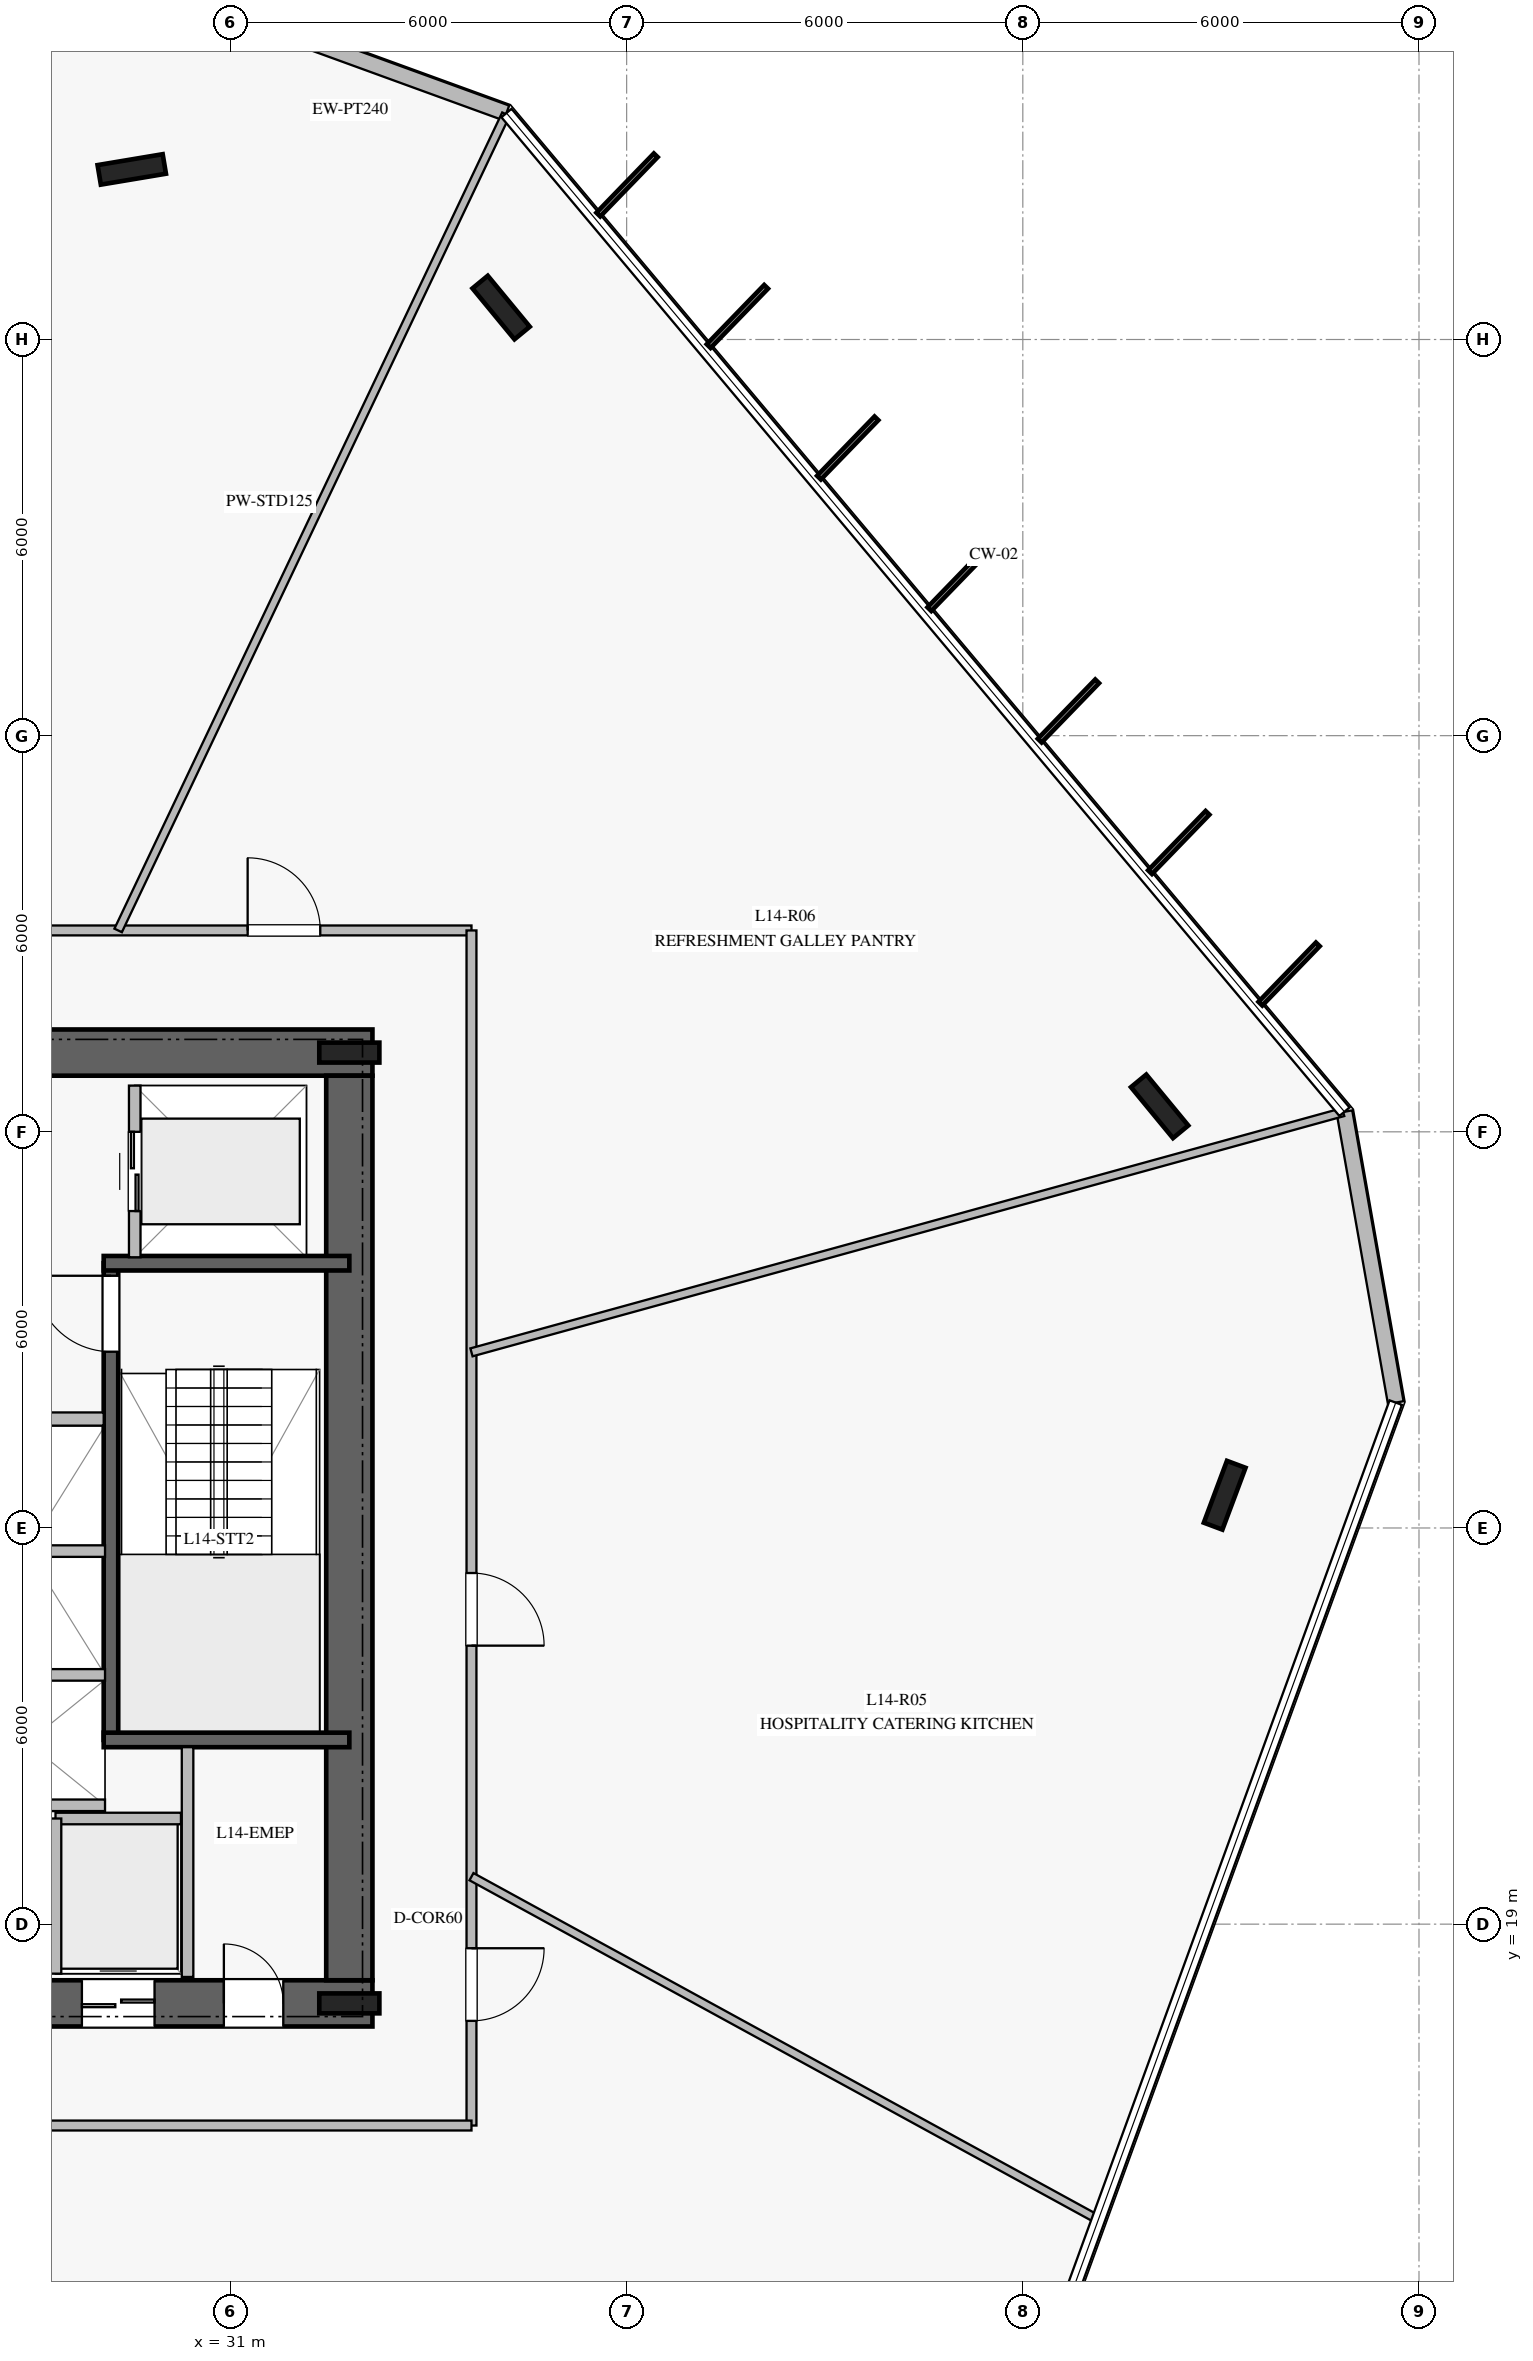
"""IFC4 building model, lengths in metres.
Left out: names, types, materials, properties, quantities, classifications, styles, units other than length and angle.
Written with IfcOpenShell. Run it as: python <this file> out.ifc"""

import sys

from ifc_helpers import new_model, si_unit, direction, frame, frame_2d, origin, origin_2d, place, context, subcontext, project, spatial, rectangle, i_section, extrude, element, fill, save


model = new_model("IFC4")
c1 = context("Model", 3, precision=1e-05, world=origin(), true_north=direction((0.0, 1.0)))
c2 = subcontext(c1, "Body", "Model", "MODEL_VIEW")
j1 = project(units=[si_unit("LENGTHUNIT", "METRE"), si_unit("PLANEANGLEUNIT", "RADIAN")], contexts=[c1])
p1 = place(None, origin())
s1 = spatial("IfcSite", under=j1, at=p1, CompositionType="ELEMENT")
p2 = place(p1, origin())
s2 = spatial("IfcBuilding", under=s1, at=p2, CompositionType="ELEMENT")
p3 = place(p2, frame((0.0, 0.0, 60.0)))
s3 = spatial("IfcBuildingStorey", under=s2, at=p3, CompositionType="ELEMENT", Elevation=60.0)
p4 = place(p3, frame((16.85, 17.8, 0.0), z_axis=(0.0, 0.0, 1.0), x_axis=(1.0, 0.0, 0.0)))
e1 = element("IfcWall", 1, at=p4, inside=s3, PredefinedType="SHEAR", context=c2, shape_type="SweptSolid", body=[
    extrude(rectangle(XDim=16.3, YDim=0.7, at=frame_2d((8.15, 0.0))), origin(), (0.0, 0.0, 1.0), 3.76),
])
p5 = place(p4, frame((5.1, 0.0, 0.0)))
e2 = element("IfcOpeningElement", 2, at=p5, cuts=e1, PredefinedType="OPENING", context=c2, shape_type="SweptSolid", body=[
    extrude(rectangle(XDim=1.2, YDim=2.25, at=frame_2d((0.6, 1.125))), frame((0.0, 0.36, 0.0), z_axis=(0.0, -1.0, 0.0), x_axis=(1.0, 0.0, 0.0)), (0.0, 0.0, 1.0), 0.72),
])
p6 = place(p4, frame((14.05, 0.0, 0.0)))
e3 = element("IfcOpeningElement", 3, at=p6, cuts=e1, PredefinedType="OPENING", context=c2, shape_type="SweptSolid", body=[
    extrude(rectangle(XDim=0.9, YDim=2.1, at=frame_2d((0.45, 1.05))), frame((0.0, 0.36, 0.0), z_axis=(0.0, -1.0, 0.0), x_axis=(1.0, 0.0, 0.0)), (0.0, 0.0, 1.0), 0.72),
])
p7 = place(p4, frame((7.95, 0.0, 0.0)))
e4 = element("IfcOpeningElement", 4, at=p7, cuts=e1, PredefinedType="OPENING", context=c2, shape_type="SweptSolid", body=[
    extrude(rectangle(XDim=1.1, YDim=2.2, at=frame_2d((0.55, 1.1))), frame((0.0, 0.36, 0.0), z_axis=(0.0, -1.0, 0.0), x_axis=(1.0, 0.0, 0.0)), (0.0, 0.0, 1.0), 0.72),
])
p8 = place(p4, frame((9.925, 0.0, 0.0)))
e5 = element("IfcOpeningElement", 5, at=p8, cuts=e1, PredefinedType="OPENING", context=c2, shape_type="SweptSolid", body=[
    extrude(rectangle(XDim=1.1, YDim=2.2, at=frame_2d((0.55, 1.1))), frame((0.0, 0.36, 0.0), z_axis=(0.0, -1.0, 0.0), x_axis=(1.0, 0.0, 0.0)), (0.0, 0.0, 1.0), 0.72),
])
p9 = place(p4, frame((11.9, 0.0, 0.0)))
e6 = element("IfcOpeningElement", 6, at=p9, cuts=e1, PredefinedType="OPENING", context=c2, shape_type="SweptSolid", body=[
    extrude(rectangle(XDim=1.1, YDim=2.2, at=frame_2d((0.55, 1.1))), frame((0.0, 0.36, 0.0), z_axis=(0.0, -1.0, 0.0), x_axis=(1.0, 0.0, 0.0)), (0.0, 0.0, 1.0), 0.72),
])
p10 = place(p3, frame((33.15, 32.2, 0.0), z_axis=(0.0, 0.0, 1.0), x_axis=(-1.0, 0.0, 0.0)))
e7 = element("IfcWall", 7, at=p10, inside=s3, PredefinedType="SHEAR", context=c2, shape_type="SweptSolid", body=[
    extrude(rectangle(XDim=16.3, YDim=0.7, at=frame_2d((8.15, 0.0))), origin(), (0.0, 0.0, 1.0), 3.76),
])
p11 = place(p10, frame((5.1, 0.0, 0.0)))
e8 = element("IfcOpeningElement", 8, at=p11, cuts=e7, PredefinedType="OPENING", context=c2, shape_type="SweptSolid", body=[
    extrude(rectangle(XDim=1.2, YDim=2.25, at=frame_2d((0.6, 1.125))), frame((0.0, 0.36, 0.0), z_axis=(0.0, -1.0, 0.0), x_axis=(1.0, 0.0, 0.0)), (0.0, 0.0, 1.0), 0.72),
])
p12 = place(p3, frame((32.8, 18.15, 0.0), z_axis=(0.0, 0.0, 1.0), x_axis=(0.0, 1.0, 0.0)))
e9 = element("IfcWall", 9, at=p12, inside=s3, PredefinedType="SHEAR", context=c2, shape_type="SweptSolid", body=[
    extrude(rectangle(XDim=13.7, YDim=0.7, at=frame_2d((6.85, 0.0))), origin(), (0.0, 0.0, 1.0), 3.76),
])
for number, where, z_axis, x_axis in (
    (10, (32.8, 17.8, 0.0), (0.0, 0.0, 1.0), (1.0, 0.0, 0.0)),
    (11, (32.8, 32.2, 0.0), (0.0, 0.0, 1.0), (1.0, 0.0, 0.0)),
):
    element("IfcColumn", number, at=place(p3, frame(where, z_axis=z_axis, x_axis=x_axis)), inside=s3, PredefinedType="COLUMN", context=c2, shape_type="SweptSolid", body=[
        extrude(i_section(OverallWidth=0.302, OverallDepth=0.91, WebThickness=0.021, FlangeThickness=0.04, at=origin_2d()), origin(), (0.0, 0.0, 1.0), 4.0),
    ])
p13 = place(p3, frame((29.19, 21.79, 0.0), z_axis=(0.0, 0.0, 1.0), x_axis=(0.0, 1.0, 0.0)))
e12 = element("IfcWall", 12, at=p13, inside=s3, PredefinedType="SOLIDWALL", context=c2, shape_type="SweptSolid", body=[
    extrude(rectangle(XDim=7.22, YDim=0.22, at=frame_2d((3.61, 0.0))), origin(), (0.0, 0.0, 1.0), 3.76),
])
p14 = place(p13, frame((5.88, 0.0, 0.0)))
e13 = element("IfcOpeningElement", 13, at=p14, cuts=e12, PredefinedType="OPENING", context=c2, shape_type="SweptSolid", body=[
    extrude(rectangle(XDim=1.15, YDim=2.2, at=frame_2d((0.575, 1.1))), frame((0.0, 0.12, 0.0), z_axis=(0.0, -1.0, 0.0), x_axis=(1.0, 0.0, 0.0)), (0.0, 0.0, 1.0), 0.24),
])
for number, where, z_axis, x_axis in (
    (14, (29.08, 21.79, 0.0), (0.0, 0.0, 1.0), (1.0, 0.0, 0.0)),
    (15, (29.08, 29.01, 0.0), (0.0, 0.0, 1.0), (1.0, 0.0, 0.0)),
):
    element("IfcWall", number, at=place(p3, frame(where, z_axis=z_axis, x_axis=x_axis)), inside=s3, PredefinedType="SOLIDWALL", context=c2, shape_type="SweptSolid", body=[
        extrude(rectangle(XDim=3.72, YDim=0.22, at=frame_2d((1.86, 0.0))), origin(), (0.0, 0.0, 1.0), 3.76),
    ])
for number, where, z_axis, x_axis in (
    (16, (45.072, 31.386, 0.0), (0.0, 0.0, 1.0), (-0.636, 0.772, 0.0)),
    (17, (35.099, 43.484, 0.0), (0.0, 0.0, 1.0), (-0.636, 0.772, 0.0)),
    (18, (29.505, 45.576, 0.0), (0.0, 0.0, 1.0), (0.986, 0.165, 0.0)),
    (19, (46.057, 25.496, 0.0), (0.0, 0.0, 1.0), (0.35, 0.937, 0.0)),
):
    element("IfcColumn", number, at=place(p3, frame(where, z_axis=z_axis, x_axis=x_axis)), inside=s3, PredefinedType="COLUMN", context=c2, shape_type="SweptSolid", body=[
        extrude(i_section(OverallWidth=0.3, OverallDepth=1.0, WebThickness=0.019, FlangeThickness=0.036, at=origin_2d()), origin(), (0.0, 0.0, 1.0), 4.0),
    ])
p15 = place(p3, frame((35.18, 46.43, 0.0), z_axis=(0.0, 0.0, 1.0), x_axis=(-0.939696189387, 0.342010338515, 0.0)))
e20 = element("IfcWall", 20, at=p15, inside=s3, PredefinedType="STANDARD", context=c2, shape_type="SweptSolid", body=[
    extrude(rectangle(XDim=4.474, YDim=0.24, at=frame_2d((2.237, 0.0))), origin(), (0.0, 0.0, 1.0), 3.76),
])
p16 = place(p3, frame((48.648, 26.899, 0.0), z_axis=(0.0, 0.0, 1.0), x_axis=(-0.173676354246, 0.984802784305, 0.0)))
e21 = element("IfcWall", 21, at=p16, inside=s3, PredefinedType="STANDARD", context=c2, shape_type="SweptSolid", body=[
    extrude(rectangle(XDim=4.473, YDim=0.24, at=frame_2d((2.236, 0.0))), origin(), (0.0, 0.0, 1.0), 3.76),
])
p17 = place(p3, frame((25.7, 26.65, 0.0), z_axis=(0.0, 0.0, 1.0), x_axis=(1.0, 0.0, 0.0)))
e22 = element("IfcWall", 22, at=p17, inside=s3, PredefinedType="PARTITIONING", context=c2, shape_type="SweptSolid", body=[
    extrude(rectangle(XDim=3.38, YDim=0.2, at=frame_2d((1.69, 0.0))), origin(), (0.0, 0.0, 1.0), 3.76),
])
p18 = place(p3, frame((30.35, 18.2, 0.0), z_axis=(0.0, 0.0, 1.0), x_axis=(0.0, 1.0, 0.0)))
e23 = element("IfcWall", 23, at=p18, inside=s3, PredefinedType="PARTITIONING", context=c2, shape_type="SweptSolid", body=[
    extrude(rectangle(XDim=3.48, YDim=0.175, at=frame_2d((1.74, 0.0))), origin(), (0.0, 0.0, 1.0), 3.76),
])
p19 = place(p3, frame((28.35, 20.6, 0.0), z_axis=(0.0, 0.0, 1.0), x_axis=(1.0, 0.0, 0.0)))
e24 = element("IfcWall", 24, at=p19, inside=s3, PredefinedType="PARTITIONING", context=c2, shape_type="SweptSolid", body=[
    extrude(rectangle(XDim=1.9, YDim=0.175, at=frame_2d((0.95, 0.0))), origin(), (0.0, 0.0, 1.0), 3.76),
])
for number, where, z_axis, x_axis in (
    (25, (28.35, 18.25, 0.0), (0.0, 0.0, 1.0), (0.0, 1.0, 0.0)),
    (26, (26.75, 20.8, 0.0), (0.0, 0.0, 1.0), (1.0, 0.0, 0.0)),
    (27, (26.75, 22.775, 0.0), (0.0, 0.0, 1.0), (1.0, 0.0, 0.0)),
    (28, (26.75, 24.65, 0.0), (0.0, 0.0, 1.0), (1.0, 0.0, 0.0)),
):
    element("IfcWall", number, at=place(p3, frame(where, z_axis=z_axis, x_axis=x_axis)), inside=s3, PredefinedType="PARTITIONING", context=c2, shape_type="SweptSolid", body=[
        extrude(rectangle(XDim=2.35, YDim=0.175, at=frame_2d((1.175, 0.0))), origin(), (0.0, 0.0, 1.0), 3.76),
    ])
p20 = place(p3, frame((29.55, 29.1, 0.0), z_axis=(0.0, 0.0, 1.0), x_axis=(0.0, 1.0, 0.0)))
e29 = element("IfcWall", 29, at=p20, inside=s3, PredefinedType="PARTITIONING", context=c2, shape_type="SweptSolid", body=[
    extrude(rectangle(XDim=2.6, YDim=0.175, at=frame_2d((1.3, 0.0))), origin(), (0.0, 0.0, 1.0), 3.76),
])
p21 = place(p20, frame((0.7, 0.0, 0.0)))
e30 = element("IfcOpeningElement", 30, at=p21, cuts=e29, PredefinedType="OPENING", context=c2, shape_type="SweptSolid", body=[
    extrude(rectangle(XDim=1.2, YDim=2.2, at=frame_2d((0.6, 1.1))), frame((0.0, 0.098, 0.0), z_axis=(0.0, -1.0, 0.0), x_axis=(1.0, 0.0, 0.0)), (0.0, 0.0, 1.0), 0.195),
])
p22 = place(p3, frame((15.35, 34.05, 0.0), z_axis=(0.0, 0.0, 1.0), x_axis=(1.0, 0.0, 0.0)))
e31 = element("IfcWall", 31, at=p22, inside=s3, PredefinedType="PARTITIONING", context=c2, shape_type="SweptSolid", body=[
    extrude(rectangle(XDim=19.3, YDim=0.15, at=frame_2d((9.65, 0.0))), origin(), (0.0, 0.0, 1.0), 3.21),
])
p23 = place(p22, frame((15.91, 0.0, 0.0)))
e32 = element("IfcOpeningElement", 32, at=p23, cuts=e31, PredefinedType="OPENING", context=c2, shape_type="SweptSolid", body=[
    extrude(rectangle(XDim=1.1, YDim=2.2, at=frame_2d((0.55, 1.1))), frame((0.0, 0.085, 0.0), z_axis=(0.0, -1.0, 0.0), x_axis=(1.0, 0.0, 0.0)), (0.0, 0.0, 1.0), 0.17),
])
p24 = place(p22, frame((9.342, 0.0, 0.0)))
e33 = element("IfcOpeningElement", 33, at=p24, cuts=e31, PredefinedType="OPENING", context=c2, shape_type="SweptSolid", body=[
    extrude(rectangle(XDim=1.1, YDim=2.2, at=frame_2d((0.55, 1.1))), frame((0.0, 0.085, 0.0), z_axis=(0.0, -1.0, 0.0), x_axis=(1.0, 0.0, 0.0)), (0.0, 0.0, 1.0), 0.17),
])
p25 = place(p22, frame((2.444, 0.0, 0.0)))
e34 = element("IfcOpeningElement", 34, at=p25, cuts=e31, PredefinedType="OPENING", context=c2, shape_type="SweptSolid", body=[
    extrude(rectangle(XDim=1.1, YDim=2.2, at=frame_2d((0.55, 1.1))), frame((0.0, 0.085, 0.0), z_axis=(0.0, -1.0, 0.0), x_axis=(1.0, 0.0, 0.0)), (0.0, 0.0, 1.0), 0.17),
])
p26 = place(p3, frame((34.65, 34.05, 0.0), z_axis=(0.0, 0.0, 1.0), x_axis=(0.0, -1.0, 0.0)))
e35 = element("IfcWall", 35, at=p26, inside=s3, PredefinedType="PARTITIONING", context=c2, shape_type="SweptSolid", body=[
    extrude(rectangle(XDim=18.1, YDim=0.15, at=frame_2d((9.05, 0.0))), origin(), (0.0, 0.0, 1.0), 3.21),
])
p27 = place(p26, frame((15.415, 0.0, 0.0)))
e36 = element("IfcOpeningElement", 36, at=p27, cuts=e35, PredefinedType="OPENING", context=c2, shape_type="SweptSolid", body=[
    extrude(rectangle(XDim=1.1, YDim=2.2, at=frame_2d((0.55, 1.1))), frame((0.0, 0.085, 0.0), z_axis=(0.0, -1.0, 0.0), x_axis=(1.0, 0.0, 0.0)), (0.0, 0.0, 1.0), 0.17),
])
p28 = place(p26, frame((9.732, 0.0, 0.0)))
e37 = element("IfcOpeningElement", 37, at=p28, cuts=e35, PredefinedType="OPENING", context=c2, shape_type="SweptSolid", body=[
    extrude(rectangle(XDim=1.1, YDim=2.2, at=frame_2d((0.55, 1.1))), frame((0.0, 0.085, 0.0), z_axis=(0.0, -1.0, 0.0), x_axis=(1.0, 0.0, 0.0)), (0.0, 0.0, 1.0), 0.17),
])
p29 = place(p3, frame((34.65, 15.95, 0.0), z_axis=(0.0, 0.0, 1.0), x_axis=(-1.0, 0.0, 0.0)))
e38 = element("IfcWall", 38, at=p29, inside=s3, PredefinedType="PARTITIONING", context=c2, shape_type="SweptSolid", body=[
    extrude(rectangle(XDim=19.3, YDim=0.15, at=frame_2d((9.65, 0.0))), origin(), (0.0, 0.0, 1.0), 3.21),
])
p30 = place(p29, frame((13.547, 0.0, 0.0)))
e39 = element("IfcOpeningElement", 39, at=p30, cuts=e38, PredefinedType="OPENING", context=c2, shape_type="SweptSolid", body=[
    extrude(rectangle(XDim=1.1, YDim=2.2, at=frame_2d((0.55, 1.1))), frame((0.0, 0.085, 0.0), z_axis=(0.0, -1.0, 0.0), x_axis=(1.0, 0.0, 0.0)), (0.0, 0.0, 1.0), 0.17),
])
p31 = place(p3, frame((29.299, 34.05, 0.0), z_axis=(0.0, 0.0, 1.0), x_axis=(0.429120489577, 0.903247255974, 0.0)))
e40 = element("IfcWall", 40, at=p31, inside=s3, PredefinedType="PARTITIONING", context=c2, shape_type="SweptSolid", body=[
    extrude(rectangle(XDim=13.686, YDim=0.125, at=frame_2d((6.843, 0.0))), origin(), (0.0, 0.0, 1.0), 3.06),
])
p32 = place(p3, frame((34.65, 19.719, 0.0), z_axis=(0.0, 0.0, 1.0), x_axis=(0.877226333311, -0.480077035637, 0.0)))
e41 = element("IfcWall", 41, at=p32, inside=s3, PredefinedType="PARTITIONING", context=c2, shape_type="SweptSolid", body=[
    extrude(rectangle(XDim=10.804, YDim=0.125, at=frame_2d((5.402, 0.0))), origin(), (0.0, 0.0, 1.0), 3.05),
])
p33 = place(p3, frame((34.65, 27.66, 0.0), z_axis=(0.0, 0.0, 1.0), x_axis=(0.964045235062, 0.265738188362, 0.0)))
e42 = element("IfcWall", 42, at=p33, inside=s3, PredefinedType="PARTITIONING", context=c2, shape_type="SweptSolid", body=[
    extrude(rectangle(XDim=13.695, YDim=0.125, at=frame_2d((6.847, 0.0))), origin(), (0.0, 0.0, 1.0), 3.06),
])
p34 = place(p14, origin())
e43 = element("IfcDoor", 43, at=p34, inside=s3, OperationType="SINGLE_SWING_RIGHT", PredefinedType="DOOR", context=c2, shape_type="SweptSolid", body=[
    extrude(rectangle(XDim=1.15, YDim=2.2, at=frame_2d((0.575, 1.1))), frame((0.0, 0.025, 0.0), z_axis=(0.0, -1.0, 0.0), x_axis=(1.0, 0.0, 0.0)), (0.0, 0.0, 1.0), 0.05),
])
fill(e13, e43)
p35 = place(p6, origin())
e44 = element("IfcDoor", 44, at=p35, inside=s3, OperationType="SINGLE_SWING_LEFT", PredefinedType="DOOR", context=c2, shape_type="SweptSolid", body=[
    extrude(rectangle(XDim=0.9, YDim=2.1, at=frame_2d((0.45, 1.05))), frame((0.0, 0.025, 0.0), z_axis=(0.0, -1.0, 0.0), x_axis=(1.0, 0.0, 0.0)), (0.0, 0.0, 1.0), 0.05),
])
fill(e3, e44)
p36 = place(p9, origin())
e45 = element("IfcDoor", 45, at=p36, inside=s3, OperationType="DOUBLE_DOOR_SLIDING", PredefinedType="DOOR", context=c2, shape_type="SweptSolid", body=[
    extrude(rectangle(XDim=1.1, YDim=2.2, at=frame_2d((0.55, 1.1))), frame((0.0, 0.025, 0.0), z_axis=(0.0, -1.0, 0.0), x_axis=(1.0, 0.0, 0.0)), (0.0, 0.0, 1.0), 0.05),
])
fill(e6, e45)
p37 = place(p21, origin())
e46 = element("IfcDoor", 46, at=p37, inside=s3, OperationType="DOUBLE_DOOR_SLIDING", PredefinedType="DOOR", context=c2, shape_type="SweptSolid", body=[
    extrude(rectangle(XDim=1.2, YDim=2.2, at=frame_2d((0.6, 1.1))), frame((0.0, 0.025, 0.0), z_axis=(0.0, -1.0, 0.0), x_axis=(1.0, 0.0, 0.0)), (0.0, 0.0, 1.0), 0.05),
])
fill(e30, e46)
p38 = place(p27, origin())
e47 = element("IfcDoor", 47, at=p38, inside=s3, OperationType="SINGLE_SWING_LEFT", PredefinedType="DOOR", context=c2, shape_type="SweptSolid", body=[
    extrude(rectangle(XDim=1.1, YDim=2.2, at=frame_2d((0.55, 1.1))), frame((0.0, 0.025, 0.0), z_axis=(0.0, -1.0, 0.0), x_axis=(1.0, 0.0, 0.0)), (0.0, 0.0, 1.0), 0.05),
])
fill(e36, e47)
p39 = place(p28, origin())
e48 = element("IfcDoor", 48, at=p39, inside=s3, OperationType="SINGLE_SWING_RIGHT", PredefinedType="DOOR", context=c2, shape_type="SweptSolid", body=[
    extrude(rectangle(XDim=1.1, YDim=2.2, at=frame_2d((0.55, 1.1))), frame((0.0, 0.025, 0.0), z_axis=(0.0, -1.0, 0.0), x_axis=(1.0, 0.0, 0.0)), (0.0, 0.0, 1.0), 0.05),
])
fill(e37, e48)
p40 = place(p23, origin())
e49 = element("IfcDoor", 49, at=p40, inside=s3, OperationType="SINGLE_SWING_LEFT", PredefinedType="DOOR", context=c2, shape_type="SweptSolid", body=[
    extrude(rectangle(XDim=1.1, YDim=2.2, at=frame_2d((0.55, 1.1))), frame((0.0, 0.025, 0.0), z_axis=(0.0, -1.0, 0.0), x_axis=(1.0, 0.0, 0.0)), (0.0, 0.0, 1.0), 0.05),
])
fill(e32, e49)
save(model, sys.argv[1])
